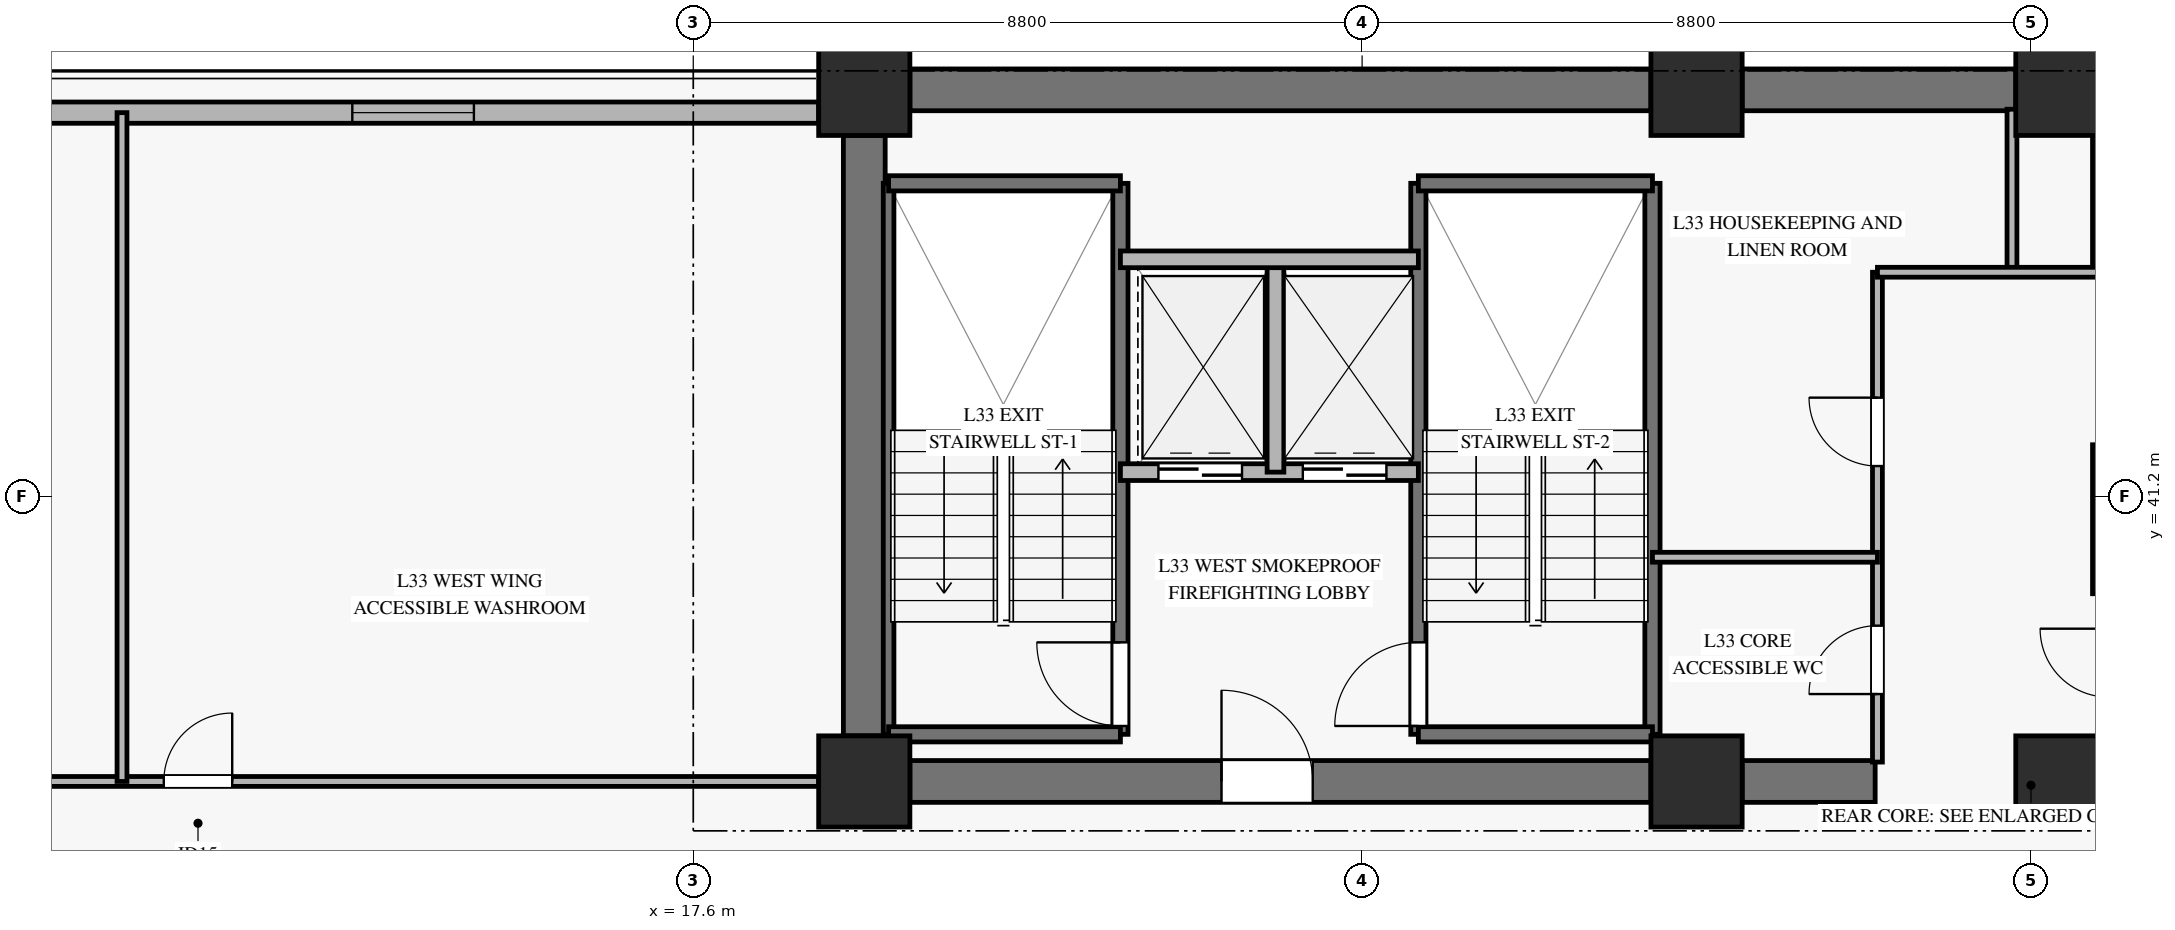
"""IFC4 building model, lengths in metres.
Left out: names, types, materials, properties, quantities, classifications, styles, units other than length and angle.
Written with IfcOpenShell. Run it as: python <this file> out.ifc"""

import sys

from ifc_helpers import new_model, si_unit, direction, frame, frame_2d, origin, origin_2d, place, context, subcontext, project, spatial, rectangle, extrude, source, transform, mapped, element, fill, save


model = new_model("IFC4")
c1 = context("Model", 3, precision=1e-05, world=origin(), true_north=direction((0.0, 1.0)))
c2 = subcontext(c1, "Body", "Model", "MODEL_VIEW")
j1 = project(units=[si_unit("LENGTHUNIT", "METRE"), si_unit("PLANEANGLEUNIT", "RADIAN")], contexts=[c1])
p1 = place(None, origin())
s1 = spatial("IfcSite", under=j1, at=p1, CompositionType="ELEMENT")
p2 = place(p1, origin())
s2 = spatial("IfcBuilding", under=s1, at=p2, CompositionType="ELEMENT")
p3 = place(p2, frame((0.0, 0.0, 137.7)))
s3 = spatial("IfcBuildingStorey", under=s2, at=p3, CompositionType="ELEMENT", Elevation=137.7)
m1 = source(origin(), c2, "Body", "SweptSolid", [
    extrude(rectangle(XDim=1.2, YDim=1.2, at=origin_2d()), origin(), (0.0, 0.0, 1.0), 3.27),
])
for number, where, z_axis, x_axis in (
    (1, (19.85, 37.45, 0.0), (0.0, 0.0, 1.0), (1.0, 0.0, 0.0)),
    (2, (19.85, 46.55, 0.0), (0.0, 0.0, 1.0), (1.0, 0.0, 0.0)),
    (3, (30.8, 37.45, 0.0), (0.0, 0.0, 1.0), (1.0, 0.0, 0.0)),
    (4, (30.8, 46.55, 0.0), (0.0, 0.0, 1.0), (1.0, 0.0, 0.0)),
    (5, (35.6, 37.45, 0.0), (0.0, 0.0, 1.0), (1.0, 0.0, 0.0)),
    (6, (35.6, 46.55, 0.0), (0.0, 0.0, 1.0), (1.0, 0.0, 0.0)),
):
    element("IfcColumn", number, at=place(p3, frame(where, z_axis=z_axis, x_axis=x_axis)), inside=s3, PredefinedType="PILASTER", context=c2, shape_type="MappedRepresentation", body=[
        mapped(m1, transform((0.0, 0.0, 0.0), x_axis=(1.0, 0.0, 0.0), y_axis=(0.0, 1.0, 0.0), z_axis=(0.0, 0.0, 1.0), scale=1.0)),
    ])
p4 = place(p3, frame((20.45, 46.55, 0.0), z_axis=(0.0, 0.0, 1.0), x_axis=(1.0, 0.0, 0.0)))
e7 = element("IfcWall", 7, at=p4, inside=s3, PredefinedType="SHEAR", context=c2, shape_type="SweptSolid", body=[
    extrude(rectangle(XDim=9.75, YDim=0.55, at=frame_2d((4.875, 0.0))), origin(), (0.0, 0.0, 1.0), 3.27),
])
p5 = place(p3, frame((31.4, 46.55, 0.0), z_axis=(0.0, 0.0, 1.0), x_axis=(1.0, 0.0, 0.0)))
e8 = element("IfcWall", 8, at=p5, inside=s3, PredefinedType="SHEAR", context=c2, shape_type="SweptSolid", body=[
    extrude(rectangle(XDim=3.6, YDim=0.55, at=frame_2d((1.8, 0.0))), origin(), (0.0, 0.0, 1.0), 3.27),
])
p6 = place(p3, frame((20.45, 37.45, 0.0), z_axis=(0.0, 0.0, 1.0), x_axis=(1.0, 0.0, 0.0)))
e9 = element("IfcWall", 9, at=p6, inside=s3, PredefinedType="SHEAR", context=c2, shape_type="SweptSolid", body=[
    extrude(rectangle(XDim=9.75, YDim=0.55, at=frame_2d((4.875, 0.0))), origin(), (0.0, 0.0, 1.0), 3.27),
])
p7 = place(p6, frame((4.1, 0.0, 0.0)))
e10 = element("IfcOpeningElement", 10, at=p7, cuts=e9, PredefinedType="OPENING", context=c2, shape_type="SweptSolid", body=[
    extrude(rectangle(XDim=1.2, YDim=2.15, at=frame_2d((0.6, 1.075))), frame((0.0, 0.285, 0.0), z_axis=(0.0, -1.0, 0.0), x_axis=(1.0, 0.0, 0.0)), (0.0, 0.0, 1.0), 0.57),
])
p8 = place(p3, frame((31.4, 37.45, 0.0), z_axis=(0.0, 0.0, 1.0), x_axis=(1.0, 0.0, 0.0)))
e11 = element("IfcWall", 11, at=p8, inside=s3, PredefinedType="SHEAR", context=c2, shape_type="SweptSolid", body=[
    extrude(rectangle(XDim=1.75, YDim=0.55, at=frame_2d((0.875, 0.0))), origin(), (0.0, 0.0, 1.0), 3.27),
])
p9 = place(p3, frame((19.85, 38.05, 0.0), z_axis=(0.0, 0.0, 1.0), x_axis=(0.0, 1.0, 0.0)))
e12 = element("IfcWall", 12, at=p9, inside=s3, PredefinedType="SHEAR", context=c2, shape_type="SweptSolid", body=[
    extrude(rectangle(XDim=7.9, YDim=0.55, at=frame_2d((3.95, 0.0))), origin(), (0.0, 0.0, 1.0), 3.27),
])
p10 = place(p3, frame((8.579, 46.25, 0.0), z_axis=(0.0, 0.0, 1.0), x_axis=(1.0, 0.0, 0.0)))
e13 = element("IfcWall", 13, at=p10, inside=s3, PredefinedType="SOLIDWALL", context=c2, shape_type="SweptSolid", body=[
    extrude(rectangle(XDim=10.671, YDim=0.28, at=frame_2d((5.335, 0.0))), origin(), (0.0, 0.0, 1.0), 2.75),
])
p11 = place(p10, frame((4.535, 0.0, 0.45)))
e14 = element("IfcOpeningElement", 14, at=p11, cuts=e13, PredefinedType="OPENING", context=c2, shape_type="SweptSolid", body=[
    extrude(rectangle(XDim=1.6, YDim=2.0, at=frame_2d((0.8, 1.0))), frame((0.0, 0.15, 0.0), z_axis=(0.0, -1.0, 0.0), x_axis=(1.0, 0.0, 0.0)), (0.0, 0.0, 1.0), 0.3),
])
p12 = place(p3, frame((20.17, 38.07, 0.0), z_axis=(0.0, 0.0, 1.0), x_axis=(0.0, 1.0, 0.0)))
e15 = element("IfcWall", 15, at=p12, inside=s3, PredefinedType="SOLIDWALL", context=c2, shape_type="SweptSolid", body=[
    extrude(rectangle(XDim=7.25, YDim=0.14, at=frame_2d((3.625, 0.0))), origin(), (0.0, 0.0, 1.0), 3.5),
])
p13 = place(p3, frame((23.22, 38.07, 0.0), z_axis=(0.0, 0.0, 1.0), x_axis=(0.0, 1.0, 0.0)))
e16 = element("IfcWall", 16, at=p13, inside=s3, PredefinedType="SOLIDWALL", context=c2, shape_type="SweptSolid", body=[
    extrude(rectangle(XDim=7.25, YDim=0.2, at=frame_2d((3.625, 0.0))), origin(), (0.0, 0.0, 1.0), 3.5),
])
p14 = place(p13, frame((0.11, 0.0, 0.0)))
e17 = element("IfcOpeningElement", 17, at=p14, cuts=e16, PredefinedType="OPENING", context=c2, shape_type="SweptSolid", body=[
    extrude(rectangle(XDim=1.1, YDim=2.15, at=frame_2d((0.55, 1.075))), frame((0.0, 0.11, 0.0), z_axis=(0.0, -1.0, 0.0), x_axis=(1.0, 0.0, 0.0)), (0.0, 0.0, 1.0), 0.22),
])
for number, where, z_axis, x_axis in (
    (18, (20.17, 45.32, 0.0), (0.0, 0.0, 1.0), (1.0, 0.0, 0.0)),
    (19, (20.17, 38.07, 0.0), (0.0, 0.0, 1.0), (1.0, 0.0, 0.0)),
):
    element("IfcWall", number, at=place(p3, frame(where, z_axis=z_axis, x_axis=x_axis)), inside=s3, PredefinedType="SOLIDWALL", context=c2, shape_type="SweptSolid", body=[
        extrude(rectangle(XDim=3.05, YDim=0.2, at=frame_2d((1.525, 0.0))), origin(), (0.0, 0.0, 1.0), 3.5),
    ])
p15 = place(p3, frame((27.14, 38.07, 0.0), z_axis=(0.0, 0.0, 1.0), x_axis=(0.0, 1.0, 0.0)))
e20 = element("IfcWall", 20, at=p15, inside=s3, PredefinedType="SOLIDWALL", context=c2, shape_type="SweptSolid", body=[
    extrude(rectangle(XDim=7.25, YDim=0.2, at=frame_2d((3.625, 0.0))), origin(), (0.0, 0.0, 1.0), 3.5),
])
p16 = place(p15, frame((0.11, 0.0, 0.0)))
e21 = element("IfcOpeningElement", 21, at=p16, cuts=e20, PredefinedType="OPENING", context=c2, shape_type="SweptSolid", body=[
    extrude(rectangle(XDim=1.1, YDim=2.15, at=frame_2d((0.55, 1.075))), frame((0.0, 0.11, 0.0), z_axis=(0.0, -1.0, 0.0), x_axis=(1.0, 0.0, 0.0)), (0.0, 0.0, 1.0), 0.22),
])
p17 = place(p3, frame((30.22, 38.07, 0.0), z_axis=(0.0, 0.0, 1.0), x_axis=(0.0, 1.0, 0.0)))
e22 = element("IfcWall", 22, at=p17, inside=s3, PredefinedType="SOLIDWALL", context=c2, shape_type="SweptSolid", body=[
    extrude(rectangle(XDim=7.25, YDim=0.2, at=frame_2d((3.625, 0.0))), origin(), (0.0, 0.0, 1.0), 3.5),
])
for number, where, z_axis, x_axis in (
    (23, (27.14, 45.32, 0.0), (0.0, 0.0, 1.0), (1.0, 0.0, 0.0)),
    (24, (27.14, 38.07, 0.0), (0.0, 0.0, 1.0), (1.0, 0.0, 0.0)),
):
    element("IfcWall", number, at=place(p3, frame(where, z_axis=z_axis, x_axis=x_axis)), inside=s3, PredefinedType="SOLIDWALL", context=c2, shape_type="SweptSolid", body=[
        extrude(rectangle(XDim=3.08, YDim=0.2, at=frame_2d((1.54, 0.0))), origin(), (0.0, 0.0, 1.0), 3.5),
    ])
p18 = place(p3, frame((23.22, 41.52, 0.0), z_axis=(0.0, 0.0, 1.0), x_axis=(1.0, 0.0, 0.0)))
e25 = element("IfcWall", 25, at=p18, inside=s3, PredefinedType="SOLIDWALL", context=c2, shape_type="SweptSolid", body=[
    extrude(rectangle(XDim=3.92, YDim=0.22, at=frame_2d((1.96, 0.0))), origin(), (0.0, 0.0, 1.0), 3.27),
])
p19 = place(p18, frame((0.5, 0.0, 0.0)))
e26 = element("IfcOpeningElement", 26, at=p19, cuts=e25, PredefinedType="OPENING", context=c2, shape_type="SweptSolid", body=[
    extrude(rectangle(XDim=1.1, YDim=2.2, at=frame_2d((0.55, 1.1))), frame((0.0, 0.12, 0.0), z_axis=(0.0, -1.0, 0.0), x_axis=(1.0, 0.0, 0.0)), (0.0, 0.0, 1.0), 0.24),
])
p20 = place(p18, frame((2.4, 0.0, 0.0)))
e27 = element("IfcOpeningElement", 27, at=p20, cuts=e25, PredefinedType="OPENING", context=c2, shape_type="SweptSolid", body=[
    extrude(rectangle(XDim=1.1, YDim=2.2, at=frame_2d((0.55, 1.1))), frame((0.0, 0.12, 0.0), z_axis=(0.0, -1.0, 0.0), x_axis=(1.0, 0.0, 0.0)), (0.0, 0.0, 1.0), 0.24),
])
p21 = place(p3, frame((25.26, 41.52, 0.0), z_axis=(0.0, 0.0, 1.0), x_axis=(0.0, 1.0, 0.0)))
e28 = element("IfcWall", 28, at=p21, inside=s3, PredefinedType="SOLIDWALL", context=c2, shape_type="SweptSolid", body=[
    extrude(rectangle(XDim=2.8, YDim=0.22, at=frame_2d((1.4, 0.0))), origin(), (0.0, 0.0, 1.0), 3.27),
])
p22 = place(p3, frame((23.22, 44.32, 0.0), z_axis=(0.0, 0.0, 1.0), x_axis=(1.0, 0.0, 0.0)))
e29 = element("IfcWall", 29, at=p22, inside=s3, PredefinedType="SOLIDWALL", context=c2, shape_type="SweptSolid", body=[
    extrude(rectangle(XDim=3.92, YDim=0.22, at=frame_2d((1.96, 0.0))), origin(), (0.0, 0.0, 1.0), 3.27),
])
p23 = place(p3, frame((36.12, 39.92, 0.0), z_axis=(0.0, 0.0, 1.0), x_axis=(0.0, 1.0, 0.0)))
e30 = element("IfcWall", 30, at=p23, inside=s3, PredefinedType="SOLIDWALL", context=c2, shape_type="SweptSolid", body=[
    extrude(rectangle(XDim=1.96, YDim=0.22, at=frame_2d((0.98, 0.0))), origin(), (0.0, 0.0, 1.0), 3.27),
])
p24 = place(p3, frame((36.12, 44.22, 0.0), z_axis=(0.0, 0.0, 1.0), x_axis=(0.0, 1.0, 0.0)))
e31 = element("IfcWall", 31, at=p24, inside=s3, PredefinedType="SOLIDWALL", context=c2, shape_type="SweptSolid", body=[
    extrude(rectangle(XDim=2.075, YDim=0.22, at=frame_2d((1.038, 0.0))), origin(), (0.0, 0.0, 1.0), 3.27),
])
p25 = place(p3, frame((33.18, 37.705, 0.0), z_axis=(0.0, 0.0, 1.0), x_axis=(0.0, 1.0, 0.0)))
e32 = element("IfcWall", 32, at=p25, inside=s3, PredefinedType="PARTITIONING", context=c2, shape_type="SweptSolid", body=[
    extrude(rectangle(XDim=6.445, YDim=0.13, at=frame_2d((3.222, 0.0))), origin(), (0.0, 0.0, 1.0), 2.22),
])
p26 = place(p25, frame((0.895, 0.0, 0.0)))
e33 = element("IfcOpeningElement", 33, at=p26, cuts=e32, PredefinedType="OPENING", context=c2, shape_type="SweptSolid", body=[
    extrude(rectangle(XDim=0.9, YDim=2.1, at=frame_2d((0.45, 1.05))), frame((0.0, 0.075, 0.0), z_axis=(0.0, -1.0, 0.0), x_axis=(1.0, 0.0, 0.0)), (0.0, 0.0, 1.0), 0.15),
])
p27 = place(p25, frame((3.895, 0.0, 0.0)))
e34 = element("IfcOpeningElement", 34, at=p27, cuts=e32, PredefinedType="OPENING", context=c2, shape_type="SweptSolid", body=[
    extrude(rectangle(XDim=0.9, YDim=2.1, at=frame_2d((0.45, 1.05))), frame((0.0, 0.075, 0.0), z_axis=(0.0, -1.0, 0.0), x_axis=(1.0, 0.0, 0.0)), (0.0, 0.0, 1.0), 0.15),
])
p28 = place(p3, frame((34.95, 44.15, 0.0), z_axis=(0.0, 0.0, 1.0), x_axis=(0.0, 1.0, 0.0)))
e35 = element("IfcWall", 35, at=p28, inside=s3, PredefinedType="PARTITIONING", context=c2, shape_type="SweptSolid", body=[
    extrude(rectangle(XDim=2.145, YDim=0.13, at=frame_2d((1.073, 0.0))), origin(), (0.0, 0.0, 1.0), 3.27),
])
p29 = place(p3, frame((33.18, 44.15, 0.0), z_axis=(0.0, 0.0, 1.0), x_axis=(1.0, 0.0, 0.0)))
e36 = element("IfcWall", 36, at=p29, inside=s3, PredefinedType="PARTITIONING", context=c2, shape_type="SweptSolid", body=[
    extrude(rectangle(XDim=2.97, YDim=0.13, at=frame_2d((1.485, 0.0))), origin(), (0.0, 0.0, 1.0), 2.555),
])
p30 = place(p3, frame((30.22, 40.4, 0.0), z_axis=(0.0, 0.0, 1.0), x_axis=(1.0, 0.0, 0.0)))
e37 = element("IfcWall", 37, at=p30, inside=s3, PredefinedType="PARTITIONING", context=c2, shape_type="SweptSolid", body=[
    extrude(rectangle(XDim=2.96, YDim=0.13, at=frame_2d((1.48, 0.0))), origin(), (0.0, 0.0, 1.0), 2.555),
])
p31 = place(p3, frame((5.214, 37.45, 0.0), z_axis=(0.0, 0.0, 1.0), x_axis=(1.0, 0.0, 0.0)))
e38 = element("IfcWall", 38, at=p31, inside=s3, PredefinedType="PARTITIONING", context=c2, shape_type="SweptSolid", body=[
    extrude(rectangle(XDim=14.036, YDim=0.13, at=frame_2d((7.018, 0.0))), origin(), (0.0, 0.0, 1.0), 2.755),
])
p32 = place(p31, frame((0.9, 0.0, 0.0)))
e39 = element("IfcOpeningElement", 39, at=p32, cuts=e38, PredefinedType="OPENING", context=c2, shape_type="SweptSolid", body=[
    extrude(rectangle(XDim=0.95, YDim=2.1, at=frame_2d((0.475, 1.05))), frame((0.0, 0.075, 0.0), z_axis=(0.0, -1.0, 0.0), x_axis=(1.0, 0.0, 0.0)), (0.0, 0.0, 1.0), 0.15),
])
p33 = place(p31, frame((5.42, 0.0, 0.0)))
e40 = element("IfcOpeningElement", 40, at=p33, cuts=e38, PredefinedType="OPENING", context=c2, shape_type="SweptSolid", body=[
    extrude(rectangle(XDim=0.9, YDim=2.1, at=frame_2d((0.45, 1.05))), frame((0.0, 0.075, 0.0), z_axis=(0.0, -1.0, 0.0), x_axis=(1.0, 0.0, 0.0)), (0.0, 0.0, 1.0), 0.15),
])
p34 = place(p3, frame((10.084, 37.45, 0.0), z_axis=(0.0, 0.0, 1.0), x_axis=(0.0, 1.0, 0.0)))
e41 = element("IfcWall", 41, at=p34, inside=s3, PredefinedType="PARTITIONING", context=c2, shape_type="SweptSolid", body=[
    extrude(rectangle(XDim=8.8, YDim=0.13, at=frame_2d((4.4, 0.0))), origin(), (0.0, 0.0, 1.0), 3.27),
])
m2 = source(origin(), c2, "Body", "SweptSolid", [
    extrude(rectangle(XDim=1.6, YDim=2.0, at=frame_2d((0.8, 1.0))), frame((0.0, 0.03, 0.0), z_axis=(0.0, -1.0, 0.0), x_axis=(1.0, 0.0, 0.0)), (0.0, 0.0, 1.0), 0.06),
])
p35 = place(p11, origin())
e42 = element("IfcWindow", 42, at=p35, inside=s3, PartitioningType="SINGLE_PANEL", PredefinedType="WINDOW", context=c2, shape_type="MappedRepresentation", body=[
    mapped(m2, transform((0.0, 0.0, 0.0), x_axis=(1.0, 0.0, 0.0), y_axis=(0.0, 1.0, 0.0), z_axis=(0.0, 0.0, 1.0), scale=1.0)),
])
fill(e14, e42)
m3 = source(origin(), c2, "Body", "SweptSolid", [
    extrude(rectangle(XDim=1.1, YDim=2.15, at=frame_2d((0.55, 1.075))), frame((0.0, 0.025, 0.0), z_axis=(0.0, -1.0, 0.0), x_axis=(1.0, 0.0, 0.0)), (0.0, 0.0, 1.0), 0.05),
])
p36 = place(p14, origin())
e43 = element("IfcDoor", 43, at=p36, inside=s3, OperationType="SINGLE_SWING_RIGHT", PredefinedType="DOOR", context=c2, shape_type="MappedRepresentation", body=[
    mapped(m3, transform((0.0, 0.0, 0.0), x_axis=(1.0, 0.0, 0.0), y_axis=(0.0, 1.0, 0.0), z_axis=(0.0, 0.0, 1.0), scale=1.0)),
])
fill(e17, e43)
p37 = place(p16, origin())
e44 = element("IfcDoor", 44, at=p37, inside=s3, OperationType="SINGLE_SWING_LEFT", PredefinedType="DOOR", context=c2, shape_type="MappedRepresentation", body=[
    mapped(m3, transform((0.0, 0.0, 0.0), x_axis=(1.0, 0.0, 0.0), y_axis=(0.0, 1.0, 0.0), z_axis=(0.0, 0.0, 1.0), scale=1.0)),
])
fill(e21, e44)
m4 = source(origin(), c2, "Body", "SweptSolid", [
    extrude(rectangle(XDim=1.1, YDim=2.2, at=frame_2d((0.55, 1.1))), frame((0.0, 0.025, 0.0), z_axis=(0.0, -1.0, 0.0), x_axis=(1.0, 0.0, 0.0)), (0.0, 0.0, 1.0), 0.05),
])
p38 = place(p19, origin())
e45 = element("IfcDoor", 45, at=p38, inside=s3, OperationType="SLIDING_TO_LEFT", PredefinedType="DOOR", context=c2, shape_type="MappedRepresentation", body=[
    mapped(m4, transform((0.0, 0.0, 0.0), x_axis=(1.0, 0.0, 0.0), y_axis=(0.0, 1.0, 0.0), z_axis=(0.0, 0.0, 1.0), scale=1.0)),
])
fill(e26, e45)
p39 = place(p20, origin())
e46 = element("IfcDoor", 46, at=p39, inside=s3, OperationType="SLIDING_TO_LEFT", PredefinedType="DOOR", context=c2, shape_type="MappedRepresentation", body=[
    mapped(m4, transform((0.0, 0.0, 0.0), x_axis=(1.0, 0.0, 0.0), y_axis=(0.0, 1.0, 0.0), z_axis=(0.0, 0.0, 1.0), scale=1.0)),
])
fill(e27, e46)
m5 = source(origin(), c2, "Body", "SweptSolid", [
    extrude(rectangle(XDim=1.2, YDim=2.15, at=frame_2d((0.6, 1.075))), frame((0.0, 0.025, 0.0), z_axis=(0.0, -1.0, 0.0), x_axis=(1.0, 0.0, 0.0)), (0.0, 0.0, 1.0), 0.05),
])
p40 = place(p7, origin())
e47 = element("IfcDoor", 47, at=p40, inside=s3, OperationType="SINGLE_SWING_LEFT", PredefinedType="DOOR", context=c2, shape_type="MappedRepresentation", body=[
    mapped(m5, transform((0.0, 0.0, 0.0), x_axis=(1.0, 0.0, 0.0), y_axis=(0.0, 1.0, 0.0), z_axis=(0.0, 0.0, 1.0), scale=1.0)),
])
fill(e10, e47)
m6 = source(origin(), c2, "Body", "SweptSolid", [
    extrude(rectangle(XDim=0.9, YDim=2.1, at=frame_2d((0.45, 1.05))), frame((0.0, 0.025, 0.0), z_axis=(0.0, -1.0, 0.0), x_axis=(1.0, 0.0, 0.0)), (0.0, 0.0, 1.0), 0.05),
])
p41 = place(p26, origin())
e48 = element("IfcDoor", 48, at=p41, inside=s3, OperationType="SINGLE_SWING_LEFT", PredefinedType="DOOR", context=c2, shape_type="MappedRepresentation", body=[
    mapped(m6, transform((0.0, 0.0, 0.0), x_axis=(1.0, 0.0, 0.0), y_axis=(0.0, 1.0, 0.0), z_axis=(0.0, 0.0, 1.0), scale=1.0)),
])
fill(e33, e48)
p42 = place(p27, origin())
e49 = element("IfcDoor", 49, at=p42, inside=s3, OperationType="SINGLE_SWING_RIGHT", PredefinedType="DOOR", context=c2, shape_type="MappedRepresentation", body=[
    mapped(m6, transform((0.0, 0.0, 0.0), x_axis=(1.0, 0.0, 0.0), y_axis=(0.0, 1.0, 0.0), z_axis=(0.0, 0.0, 1.0), scale=1.0)),
])
fill(e34, e49)
p43 = place(p33, origin())
e50 = element("IfcDoor", 50, at=p43, inside=s3, OperationType="SINGLE_SWING_RIGHT", PredefinedType="DOOR", context=c2, shape_type="MappedRepresentation", body=[
    mapped(m6, transform((0.0, 0.0, 0.0), x_axis=(1.0, 0.0, 0.0), y_axis=(0.0, 1.0, 0.0), z_axis=(0.0, 0.0, 1.0), scale=1.0)),
])
fill(e40, e50)
save(model, sys.argv[1])
